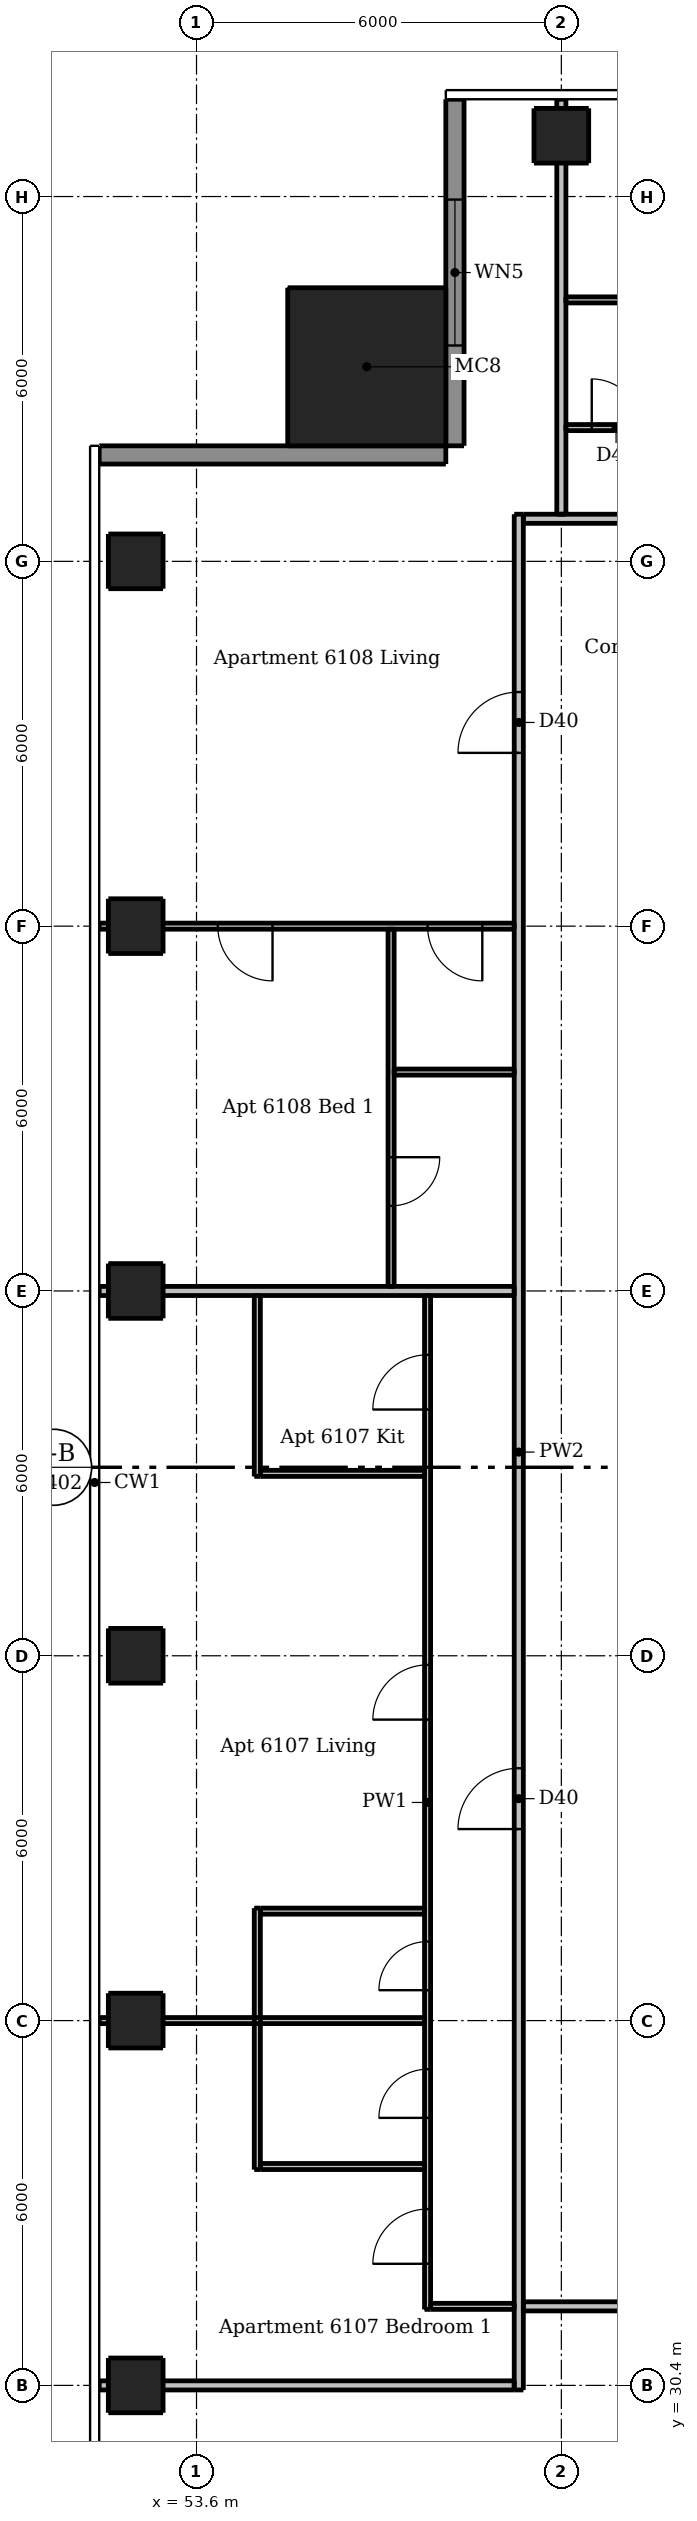
"""IFC4 building model, lengths in metres.
Left out: names, types, materials, properties, quantities, classifications, styles, units other than length and angle.
Written with IfcOpenShell. Run it as: python <this file> out.ifc"""

import sys

from ifc_helpers import new_model, si_unit, direction, frame, frame_2d, origin, origin_2d, place, context, subcontext, project, spatial, rectangle, extrude, element, fill, save


model = new_model("IFC4")
c1 = context("Model", 3, precision=1e-05, world=origin(), true_north=direction((0.0, 1.0)))
c2 = subcontext(c1, "Body", "Model", "MODEL_VIEW")
j1 = project(units=[si_unit("LENGTHUNIT", "METRE"), si_unit("PLANEANGLEUNIT", "RADIAN")], contexts=[c1])
p1 = place(None, origin())
s1 = spatial("IfcSite", under=j1, at=p1, CompositionType="ELEMENT")
p2 = place(p1, origin())
s2 = spatial("IfcBuilding", under=s1, at=p2, CompositionType="ELEMENT")
p3 = place(p2, frame((0.0, 0.0, 226.6)))
s3 = spatial("IfcBuildingStorey", under=s2, at=p3, CompositionType="ELEMENT", Elevation=226.6)
for number, where, z_axis, x_axis in (
    (1, (59.6, 67.4, 0.0), (0.0, 0.0, 1.0), (1.0, 0.0, 0.0)),
    (2, (52.6, 30.4, 0.0), (0.0, 0.0, 1.0), (1.0, 0.0, 0.0)),
    (3, (52.6, 36.4, 0.0), (0.0, 0.0, 1.0), (1.0, 0.0, 0.0)),
    (4, (52.6, 42.4, 0.0), (0.0, 0.0, 1.0), (1.0, 0.0, 0.0)),
    (5, (52.6, 48.4, 0.0), (0.0, 0.0, 1.0), (1.0, 0.0, 0.0)),
    (6, (52.6, 54.4, 0.0), (0.0, 0.0, 1.0), (1.0, 0.0, 0.0)),
    (7, (52.6, 60.4, 0.0), (0.0, 0.0, 1.0), (1.0, 0.0, 0.0)),
):
    element("IfcColumn", number, at=place(p3, frame(where, z_axis=z_axis, x_axis=x_axis)), inside=s3, PredefinedType="COLUMN", context=c2, shape_type="SweptSolid", body=[
        extrude(rectangle(XDim=0.9, YDim=0.9, at=origin_2d()), origin(), (0.0, 0.0, 1.0), 2.95),
    ])
p4 = place(p3, frame((56.4, 63.6, 0.0), z_axis=(0.0, 0.0, 1.0), x_axis=(1.0, 0.0, 0.0)))
e8 = element("IfcColumn", 8, at=p4, inside=s3, PredefinedType="COLUMN", context=c2, shape_type="SweptSolid", body=[
    extrude(rectangle(XDim=2.6, YDim=2.6, at=origin_2d()), origin(), (0.0, 0.0, 1.0), 3.3),
])
p5 = place(p3, frame((57.85, 68.0, 0.0), z_axis=(0.0, 0.0, 1.0), x_axis=(0.0, -1.0, 0.0)))
e9 = element("IfcWall", 9, at=p5, inside=s3, PredefinedType="SOLIDWALL", context=c2, shape_type="SweptSolid", body=[
    extrude(rectangle(XDim=5.7, YDim=0.3, at=frame_2d((2.85, 0.0))), origin(), (0.0, 0.0, 1.0), 2.95),
])
p6 = place(p5, frame((1.65, 0.0, 0.15)))
e10 = element("IfcOpeningElement", 10, at=p6, cuts=e9, PredefinedType="OPENING", context=c2, shape_type="SweptSolid", body=[
    extrude(rectangle(XDim=2.4, YDim=2.1, at=frame_2d((1.2, 1.05))), frame((0.0, 0.16, 0.0), z_axis=(0.0, -1.0, 0.0), x_axis=(1.0, 0.0, 0.0)), (0.0, 0.0, 1.0), 0.32),
])
p7 = place(p3, frame((57.7, 62.15, 0.0), z_axis=(0.0, 0.0, 1.0), x_axis=(-1.0, 0.0, 0.0)))
e11 = element("IfcWall", 11, at=p7, inside=s3, PredefinedType="SOLIDWALL", context=c2, shape_type="SweptSolid", body=[
    extrude(rectangle(XDim=5.7, YDim=0.3, at=frame_2d((2.85, 0.0))), origin(), (0.0, 0.0, 1.0), 2.95),
])
p8 = place(p3, frame((54.6, 33.95, 0.0), z_axis=(0.0, 0.0, 1.0), x_axis=(0.0, 1.0, 0.0)))
e12 = element("IfcWall", 12, at=p8, inside=s3, PredefinedType="PARTITIONING", context=c2, shape_type="SweptSolid", body=[
    extrude(rectangle(XDim=4.3, YDim=0.1, at=frame_2d((2.15, 0.0))), origin(), (0.0, 0.0, 1.0), 2.95),
])
p9 = place(p3, frame((54.6, 45.35, 0.0), z_axis=(0.0, 0.0, 1.0), x_axis=(0.0, 1.0, 0.0)))
e13 = element("IfcWall", 13, at=p9, inside=s3, PredefinedType="PARTITIONING", context=c2, shape_type="SweptSolid", body=[
    extrude(rectangle(XDim=2.975, YDim=0.1, at=frame_2d((1.487, 0.0))), origin(), (0.0, 0.0, 1.0), 2.95),
])
p10 = place(p3, frame((56.8, 54.35, 0.0), z_axis=(0.0, 0.0, 1.0), x_axis=(0.0, -1.0, 0.0)))
e14 = element("IfcWall", 14, at=p10, inside=s3, PredefinedType="PARTITIONING", context=c2, shape_type="SweptSolid", body=[
    extrude(rectangle(XDim=5.875, YDim=0.1, at=frame_2d((2.938, 0.0))), origin(), (0.0, 0.0, 1.0), 2.95),
])
p11 = place(p10, frame((3.75, 0.0, 0.0)))
e15 = element("IfcOpeningElement", 15, at=p11, cuts=e14, PredefinedType="OPENING", context=c2, shape_type="SweptSolid", body=[
    extrude(rectangle(XDim=0.8, YDim=2.1, at=frame_2d((0.4, 1.05))), frame((0.0, 0.06, 0.0), z_axis=(0.0, -1.0, 0.0), x_axis=(1.0, 0.0, 0.0)), (0.0, 0.0, 1.0), 0.12),
])
p12 = place(p3, frame((57.4, 31.65, 0.0), z_axis=(0.0, 0.0, 1.0), x_axis=(0.0, 1.0, 0.0)))
e16 = element("IfcWall", 16, at=p12, inside=s3, PredefinedType="PARTITIONING", context=c2, shape_type="SweptSolid", body=[
    extrude(rectangle(XDim=16.675, YDim=0.1, at=frame_2d((8.337, 0.0))), origin(), (0.0, 0.0, 1.0), 2.95),
])
p13 = place(p12, frame((9.7, 0.0, 0.0)))
e17 = element("IfcOpeningElement", 17, at=p13, cuts=e16, PredefinedType="OPENING", context=c2, shape_type="SweptSolid", body=[
    extrude(rectangle(XDim=0.9, YDim=2.1, at=frame_2d((0.45, 1.05))), frame((0.0, 0.06, 0.0), z_axis=(0.0, -1.0, 0.0), x_axis=(1.0, 0.0, 0.0)), (0.0, 0.0, 1.0), 0.12),
])
p14 = place(p12, frame((14.8, 0.0, 0.0)))
e18 = element("IfcOpeningElement", 18, at=p14, cuts=e16, PredefinedType="OPENING", context=c2, shape_type="SweptSolid", body=[
    extrude(rectangle(XDim=0.9, YDim=2.1, at=frame_2d((0.45, 1.05))), frame((0.0, 0.06, 0.0), z_axis=(0.0, -1.0, 0.0), x_axis=(1.0, 0.0, 0.0)), (0.0, 0.0, 1.0), 0.12),
])
p15 = place(p12, frame((5.25, 0.0, 0.0)))
e19 = element("IfcOpeningElement", 19, at=p15, cuts=e16, PredefinedType="OPENING", context=c2, shape_type="SweptSolid", body=[
    extrude(rectangle(XDim=0.8, YDim=2.1, at=frame_2d((0.4, 1.05))), frame((0.0, 0.06, 0.0), z_axis=(0.0, -1.0, 0.0), x_axis=(1.0, 0.0, 0.0)), (0.0, 0.0, 1.0), 0.12),
])
p16 = place(p12, frame((0.75, 0.0, 0.0)))
e20 = element("IfcOpeningElement", 20, at=p16, cuts=e16, PredefinedType="OPENING", context=c2, shape_type="SweptSolid", body=[
    extrude(rectangle(XDim=0.9, YDim=2.1, at=frame_2d((0.45, 1.05))), frame((0.0, 0.06, 0.0), z_axis=(0.0, -1.0, 0.0), x_axis=(1.0, 0.0, 0.0)), (0.0, 0.0, 1.0), 0.12),
])
p17 = place(p12, frame((3.15, 0.0, 0.0)))
e21 = element("IfcOpeningElement", 21, at=p17, cuts=e16, PredefinedType="OPENING", context=c2, shape_type="SweptSolid", body=[
    extrude(rectangle(XDim=0.8, YDim=2.1, at=frame_2d((0.4, 1.05))), frame((0.0, 0.06, 0.0), z_axis=(0.0, -1.0, 0.0), x_axis=(1.0, 0.0, 0.0)), (0.0, 0.0, 1.0), 0.12),
])
p18 = place(p3, frame((59.675, 64.7, 0.0), z_axis=(0.0, 0.0, 1.0), x_axis=(1.0, 0.0, 0.0)))
e22 = element("IfcWall", 22, at=p18, inside=s3, PredefinedType="PARTITIONING", context=c2, shape_type="SweptSolid", body=[
    extrude(rectangle(XDim=1.675, YDim=0.1, at=frame_2d((0.837, 0.0))), origin(), (0.0, 0.0, 1.0), 2.95),
])
p19 = place(p3, frame((59.675, 62.6, 0.0), z_axis=(0.0, 0.0, 1.0), x_axis=(1.0, 0.0, 0.0)))
e23 = element("IfcWall", 23, at=p19, inside=s3, PredefinedType="PARTITIONING", context=c2, shape_type="SweptSolid", body=[
    extrude(rectangle(XDim=17.85, YDim=0.1, at=frame_2d((8.925, 0.0))), origin(), (0.0, 0.0, 1.0), 2.95),
])
p20 = place(p19, frame((4.875, 0.0, 0.0)))
e24 = element("IfcOpeningElement", 24, at=p20, cuts=e23, PredefinedType="OPENING", context=c2, shape_type="SweptSolid", body=[
    extrude(rectangle(XDim=0.9, YDim=2.1, at=frame_2d((0.45, 1.05))), frame((0.0, 0.06, 0.0), z_axis=(0.0, -1.0, 0.0), x_axis=(1.0, 0.0, 0.0)), (0.0, 0.0, 1.0), 0.12),
])
p21 = place(p19, frame((9.975, 0.0, 0.0)))
e25 = element("IfcOpeningElement", 25, at=p21, cuts=e23, PredefinedType="OPENING", context=c2, shape_type="SweptSolid", body=[
    extrude(rectangle(XDim=0.9, YDim=2.1, at=frame_2d((0.45, 1.05))), frame((0.0, 0.06, 0.0), z_axis=(0.0, -1.0, 0.0), x_axis=(1.0, 0.0, 0.0)), (0.0, 0.0, 1.0), 0.12),
])
p22 = place(p19, frame((0.425, 0.0, 0.0)))
e26 = element("IfcOpeningElement", 26, at=p22, cuts=e23, PredefinedType="OPENING", context=c2, shape_type="SweptSolid", body=[
    extrude(rectangle(XDim=0.8, YDim=2.1, at=frame_2d((0.4, 1.05))), frame((0.0, 0.06, 0.0), z_axis=(0.0, -1.0, 0.0), x_axis=(1.0, 0.0, 0.0)), (0.0, 0.0, 1.0), 0.12),
])
p23 = place(p19, frame((15.675, 0.0, 0.0)))
e27 = element("IfcOpeningElement", 27, at=p23, cuts=e23, PredefinedType="OPENING", context=c2, shape_type="SweptSolid", body=[
    extrude(rectangle(XDim=0.9, YDim=2.1, at=frame_2d((0.45, 1.05))), frame((0.0, 0.06, 0.0), z_axis=(0.0, -1.0, 0.0), x_axis=(1.0, 0.0, 0.0)), (0.0, 0.0, 1.0), 0.12),
])
p24 = place(p19, frame((12.725, 0.0, 0.0)))
e28 = element("IfcOpeningElement", 28, at=p24, cuts=e23, PredefinedType="OPENING", context=c2, shape_type="SweptSolid", body=[
    extrude(rectangle(XDim=0.8, YDim=2.1, at=frame_2d((0.4, 1.05))), frame((0.0, 0.06, 0.0), z_axis=(0.0, -1.0, 0.0), x_axis=(1.0, 0.0, 0.0)), (0.0, 0.0, 1.0), 0.12),
])
p25 = place(p3, frame((58.825, 54.4, 0.0), z_axis=(0.0, 0.0, 1.0), x_axis=(-1.0, 0.0, 0.0)))
e29 = element("IfcWall", 29, at=p25, inside=s3, PredefinedType="PARTITIONING", context=c2, shape_type="SweptSolid", body=[
    extrude(rectangle(XDim=6.825, YDim=0.1, at=frame_2d((3.413, 0.0))), origin(), (0.0, 0.0, 1.0), 2.332),
])
p26 = place(p25, frame((0.525, 0.0, 0.0)))
e30 = element("IfcOpeningElement", 30, at=p26, cuts=e29, PredefinedType="OPENING", context=c2, shape_type="SweptSolid", body=[
    extrude(rectangle(XDim=0.9, YDim=2.1, at=frame_2d((0.45, 1.05))), frame((0.0, 0.06, 0.0), z_axis=(0.0, -1.0, 0.0), x_axis=(1.0, 0.0, 0.0)), (0.0, 0.0, 1.0), 0.12),
])
p27 = place(p25, frame((3.975, 0.0, 0.0)))
e31 = element("IfcOpeningElement", 31, at=p27, cuts=e29, PredefinedType="OPENING", context=c2, shape_type="SweptSolid", body=[
    extrude(rectangle(XDim=0.9, YDim=2.1, at=frame_2d((0.45, 1.05))), frame((0.0, 0.06, 0.0), z_axis=(0.0, -1.0, 0.0), x_axis=(1.0, 0.0, 0.0)), (0.0, 0.0, 1.0), 0.12),
])
p28 = place(p3, frame((56.85, 52.0, 0.0), z_axis=(0.0, 0.0, 1.0), x_axis=(1.0, 0.0, 0.0)))
e32 = element("IfcWall", 32, at=p28, inside=s3, PredefinedType="PARTITIONING", context=c2, shape_type="SweptSolid", body=[
    extrude(rectangle(XDim=1.975, YDim=0.1, at=frame_2d((0.987, 0.0))), origin(), (0.0, 0.0, 1.0), 2.95),
])
for number, where, z_axis, x_axis in (
    (33, (54.65, 45.4, 0.0), (0.0, 0.0, 1.0), (1.0, 0.0, 0.0)),
    (34, (54.65, 38.2, 0.0), (0.0, 0.0, 1.0), (1.0, 0.0, 0.0)),
):
    element("IfcWall", number, at=place(p3, frame(where, z_axis=z_axis, x_axis=x_axis)), inside=s3, PredefinedType="PARTITIONING", context=c2, shape_type="SweptSolid", body=[
        extrude(rectangle(XDim=2.7, YDim=0.1, at=frame_2d((1.35, 0.0))), origin(), (0.0, 0.0, 1.0), 2.95),
    ])
p29 = place(p3, frame((52.0, 36.4, 0.0), z_axis=(0.0, 0.0, 1.0), x_axis=(1.0, 0.0, 0.0)))
e35 = element("IfcWall", 35, at=p29, inside=s3, PredefinedType="PARTITIONING", context=c2, shape_type="SweptSolid", body=[
    extrude(rectangle(XDim=5.35, YDim=0.1, at=frame_2d((2.675, 0.0))), origin(), (0.0, 0.0, 1.0), 2.332),
])
p30 = place(p3, frame((54.65, 34.0, 0.0), z_axis=(0.0, 0.0, 1.0), x_axis=(1.0, 0.0, 0.0)))
e36 = element("IfcWall", 36, at=p30, inside=s3, PredefinedType="PARTITIONING", context=c2, shape_type="SweptSolid", body=[
    extrude(rectangle(XDim=2.7, YDim=0.1, at=frame_2d((1.35, 0.0))), origin(), (0.0, 0.0, 1.0), 2.95),
])
p31 = place(p3, frame((57.45, 31.7, 0.0), z_axis=(0.0, 0.0, 1.0), x_axis=(1.0, 0.0, 0.0)))
e37 = element("IfcWall", 37, at=p31, inside=s3, PredefinedType="PARTITIONING", context=c2, shape_type="SweptSolid", body=[
    extrude(rectangle(XDim=1.375, YDim=0.1, at=frame_2d((0.688, 0.0))), origin(), (0.0, 0.0, 1.0), 2.95),
])
p32 = place(p3, frame((58.9, 30.325, 0.0), z_axis=(0.0, 0.0, 1.0), x_axis=(0.0, 1.0, 0.0)))
e38 = element("IfcWall", 38, at=p32, inside=s3, PredefinedType="PARTITIONING", context=c2, shape_type="SweptSolid", body=[
    extrude(rectangle(XDim=30.85, YDim=0.15, at=frame_2d((15.425, 0.0))), origin(), (0.0, 0.0, 1.0), 2.95),
])
p33 = place(p32, frame((9.225, 0.0, 0.0)))
e39 = element("IfcOpeningElement", 39, at=p33, cuts=e38, PredefinedType="OPENING", context=c2, shape_type="SweptSolid", body=[
    extrude(rectangle(XDim=1.0, YDim=2.1, at=frame_2d((0.5, 1.05))), frame((0.0, 0.085, 0.0), z_axis=(0.0, -1.0, 0.0), x_axis=(1.0, 0.0, 0.0)), (0.0, 0.0, 1.0), 0.17),
])
p34 = place(p32, frame((26.925, 0.0, 0.0)))
e40 = element("IfcOpeningElement", 40, at=p34, cuts=e38, PredefinedType="OPENING", context=c2, shape_type="SweptSolid", body=[
    extrude(rectangle(XDim=1.0, YDim=2.1, at=frame_2d((0.5, 1.05))), frame((0.0, 0.085, 0.0), z_axis=(0.0, -1.0, 0.0), x_axis=(1.0, 0.0, 0.0)), (0.0, 0.0, 1.0), 0.17),
])
p35 = place(p3, frame((59.6, 61.175, 0.0), z_axis=(0.0, 0.0, 1.0), x_axis=(0.0, 1.0, 0.0)))
e41 = element("IfcWall", 41, at=p35, inside=s3, PredefinedType="PARTITIONING", context=c2, shape_type="SweptSolid", body=[
    extrude(rectangle(XDim=6.825, YDim=0.15, at=frame_2d((3.413, 0.0))), origin(), (0.0, 0.0, 1.0), 2.332),
])
p36 = place(p3, frame((58.975, 61.1, 0.0), z_axis=(0.0, 0.0, 1.0), x_axis=(1.0, 0.0, 0.0)))
e42 = element("IfcWall", 42, at=p36, inside=s3, PredefinedType="PARTITIONING", context=c2, shape_type="SweptSolid", body=[
    extrude(rectangle(XDim=29.25, YDim=0.15, at=frame_2d((14.625, 0.0))), origin(), (0.0, 0.0, 1.0), 2.95),
])
p37 = place(p36, frame((9.125, 0.0, 0.0)))
e43 = element("IfcOpeningElement", 43, at=p37, cuts=e42, PredefinedType="OPENING", context=c2, shape_type="SweptSolid", body=[
    extrude(rectangle(XDim=1.0, YDim=2.1, at=frame_2d((0.5, 1.05))), frame((0.0, 0.085, 0.0), z_axis=(0.0, -1.0, 0.0), x_axis=(1.0, 0.0, 0.0)), (0.0, 0.0, 1.0), 0.17),
])
p38 = place(p36, frame((26.475, 0.0, 0.0)))
e44 = element("IfcOpeningElement", 44, at=p38, cuts=e42, PredefinedType="OPENING", context=c2, shape_type="SweptSolid", body=[
    extrude(rectangle(XDim=1.0, YDim=2.1, at=frame_2d((0.5, 1.05))), frame((0.0, 0.085, 0.0), z_axis=(0.0, -1.0, 0.0), x_axis=(1.0, 0.0, 0.0)), (0.0, 0.0, 1.0), 0.17),
])
p39 = place(p3, frame((52.0, 48.4, 0.0), z_axis=(0.0, 0.0, 1.0), x_axis=(1.0, 0.0, 0.0)))
e45 = element("IfcWall", 45, at=p39, inside=s3, PredefinedType="PARTITIONING", context=c2, shape_type="SweptSolid", body=[
    extrude(rectangle(XDim=6.825, YDim=0.15, at=frame_2d((3.413, 0.0))), origin(), (0.0, 0.0, 1.0), 2.332),
])
p40 = place(p3, frame((89.525, 31.7, 0.0), z_axis=(0.0, 0.0, 1.0), x_axis=(-1.0, 0.0, 0.0)))
e46 = element("IfcWall", 46, at=p40, inside=s3, PredefinedType="PARTITIONING", context=c2, shape_type="SweptSolid", body=[
    extrude(rectangle(XDim=30.55, YDim=0.15, at=frame_2d((15.275, 0.0))), origin(), (0.0, 0.0, 1.0), 2.95),
])
p41 = place(p40, frame((26.775, 0.0, 0.0)))
e47 = element("IfcOpeningElement", 47, at=p41, cuts=e46, PredefinedType="OPENING", context=c2, shape_type="SweptSolid", body=[
    extrude(rectangle(XDim=1.0, YDim=2.1, at=frame_2d((0.5, 1.05))), frame((0.0, 0.085, 0.0), z_axis=(0.0, -1.0, 0.0), x_axis=(1.0, 0.0, 0.0)), (0.0, 0.0, 1.0), 0.17),
])
p42 = place(p40, frame((9.075, 0.0, 0.0)))
e48 = element("IfcOpeningElement", 48, at=p42, cuts=e46, PredefinedType="OPENING", context=c2, shape_type="SweptSolid", body=[
    extrude(rectangle(XDim=1.0, YDim=2.1, at=frame_2d((0.5, 1.05))), frame((0.0, 0.085, 0.0), z_axis=(0.0, -1.0, 0.0), x_axis=(1.0, 0.0, 0.0)), (0.0, 0.0, 1.0), 0.17),
])
p43 = place(p3, frame((52.0, 30.4, 0.0), z_axis=(0.0, 0.0, 1.0), x_axis=(1.0, 0.0, 0.0)))
e49 = element("IfcWall", 49, at=p43, inside=s3, PredefinedType="PARTITIONING", context=c2, shape_type="SweptSolid", body=[
    extrude(rectangle(XDim=6.825, YDim=0.15, at=frame_2d((3.413, 0.0))), origin(), (0.0, 0.0, 1.0), 2.332),
])
p44 = place(p6, origin())
e50 = element("IfcWindow", 50, at=p44, inside=s3, PartitioningType="DOUBLE_PANEL_VERTICAL", PredefinedType="WINDOW", context=c2, shape_type="SweptSolid", body=[
    extrude(rectangle(XDim=2.4, YDim=2.1, at=frame_2d((1.2, 1.05))), frame((0.0, 0.03, 0.0), z_axis=(0.0, -1.0, 0.0), x_axis=(1.0, 0.0, 0.0)), (0.0, 0.0, 1.0), 0.06),
])
fill(e10, e50)
p45 = place(p22, origin())
e51 = element("IfcDoor", 51, at=p45, inside=s3, OperationType="SINGLE_SWING_LEFT", PredefinedType="DOOR", context=c2, shape_type="SweptSolid", body=[
    extrude(rectangle(XDim=0.8, YDim=2.1, at=frame_2d((0.4, 1.05))), frame((0.0, 0.025, 0.0), z_axis=(0.0, -1.0, 0.0), x_axis=(1.0, 0.0, 0.0)), (0.0, 0.0, 1.0), 0.05),
])
fill(e26, e51)
p46 = place(p33, origin())
e52 = element("IfcDoor", 52, at=p46, inside=s3, OperationType="SINGLE_SWING_LEFT", PredefinedType="DOOR", context=c2, shape_type="SweptSolid", body=[
    extrude(rectangle(XDim=1.0, YDim=2.1, at=frame_2d((0.5, 1.05))), frame((0.0, 0.025, 0.0), z_axis=(0.0, -1.0, 0.0), x_axis=(1.0, 0.0, 0.0)), (0.0, 0.0, 1.0), 0.05),
])
fill(e39, e52)
p47 = place(p13, origin())
e53 = element("IfcDoor", 53, at=p47, inside=s3, OperationType="SINGLE_SWING_LEFT", PredefinedType="DOOR", context=c2, shape_type="SweptSolid", body=[
    extrude(rectangle(XDim=0.9, YDim=2.1, at=frame_2d((0.45, 1.05))), frame((0.0, 0.025, 0.0), z_axis=(0.0, -1.0, 0.0), x_axis=(1.0, 0.0, 0.0)), (0.0, 0.0, 1.0), 0.05),
])
fill(e17, e53)
p48 = place(p14, origin())
e54 = element("IfcDoor", 54, at=p48, inside=s3, OperationType="SINGLE_SWING_LEFT", PredefinedType="DOOR", context=c2, shape_type="SweptSolid", body=[
    extrude(rectangle(XDim=0.9, YDim=2.1, at=frame_2d((0.45, 1.05))), frame((0.0, 0.025, 0.0), z_axis=(0.0, -1.0, 0.0), x_axis=(1.0, 0.0, 0.0)), (0.0, 0.0, 1.0), 0.05),
])
fill(e18, e54)
p49 = place(p15, origin())
e55 = element("IfcDoor", 55, at=p49, inside=s3, OperationType="SINGLE_SWING_LEFT", PredefinedType="DOOR", context=c2, shape_type="SweptSolid", body=[
    extrude(rectangle(XDim=0.8, YDim=2.1, at=frame_2d((0.4, 1.05))), frame((0.0, 0.025, 0.0), z_axis=(0.0, -1.0, 0.0), x_axis=(1.0, 0.0, 0.0)), (0.0, 0.0, 1.0), 0.05),
])
fill(e19, e55)
p50 = place(p16, origin())
e56 = element("IfcDoor", 56, at=p50, inside=s3, OperationType="SINGLE_SWING_LEFT", PredefinedType="DOOR", context=c2, shape_type="SweptSolid", body=[
    extrude(rectangle(XDim=0.9, YDim=2.1, at=frame_2d((0.45, 1.05))), frame((0.0, 0.025, 0.0), z_axis=(0.0, -1.0, 0.0), x_axis=(1.0, 0.0, 0.0)), (0.0, 0.0, 1.0), 0.05),
])
fill(e20, e56)
p51 = place(p17, origin())
e57 = element("IfcDoor", 57, at=p51, inside=s3, OperationType="SINGLE_SWING_LEFT", PredefinedType="DOOR", context=c2, shape_type="SweptSolid", body=[
    extrude(rectangle(XDim=0.8, YDim=2.1, at=frame_2d((0.4, 1.05))), frame((0.0, 0.025, 0.0), z_axis=(0.0, -1.0, 0.0), x_axis=(1.0, 0.0, 0.0)), (0.0, 0.0, 1.0), 0.05),
])
fill(e21, e57)
p52 = place(p34, origin())
e58 = element("IfcDoor", 58, at=p52, inside=s3, OperationType="SINGLE_SWING_LEFT", PredefinedType="DOOR", context=c2, shape_type="SweptSolid", body=[
    extrude(rectangle(XDim=1.0, YDim=2.1, at=frame_2d((0.5, 1.05))), frame((0.0, 0.025, 0.0), z_axis=(0.0, -1.0, 0.0), x_axis=(1.0, 0.0, 0.0)), (0.0, 0.0, 1.0), 0.05),
])
fill(e40, e58)
p53 = place(p26, origin())
e59 = element("IfcDoor", 59, at=p53, inside=s3, OperationType="SINGLE_SWING_LEFT", PredefinedType="DOOR", context=c2, shape_type="SweptSolid", body=[
    extrude(rectangle(XDim=0.9, YDim=2.1, at=frame_2d((0.45, 1.05))), frame((0.0, 0.025, 0.0), z_axis=(0.0, -1.0, 0.0), x_axis=(1.0, 0.0, 0.0)), (0.0, 0.0, 1.0), 0.05),
])
fill(e30, e59)
p54 = place(p27, origin())
e60 = element("IfcDoor", 60, at=p54, inside=s3, OperationType="SINGLE_SWING_LEFT", PredefinedType="DOOR", context=c2, shape_type="SweptSolid", body=[
    extrude(rectangle(XDim=0.9, YDim=2.1, at=frame_2d((0.45, 1.05))), frame((0.0, 0.025, 0.0), z_axis=(0.0, -1.0, 0.0), x_axis=(1.0, 0.0, 0.0)), (0.0, 0.0, 1.0), 0.05),
])
fill(e31, e60)
p55 = place(p11, origin())
e61 = element("IfcDoor", 61, at=p55, inside=s3, OperationType="SINGLE_SWING_LEFT", PredefinedType="DOOR", context=c2, shape_type="SweptSolid", body=[
    extrude(rectangle(XDim=0.8, YDim=2.1, at=frame_2d((0.4, 1.05))), frame((0.0, 0.025, 0.0), z_axis=(0.0, -1.0, 0.0), x_axis=(1.0, 0.0, 0.0)), (0.0, 0.0, 1.0), 0.05),
])
fill(e15, e61)
save(model, sys.argv[1])
